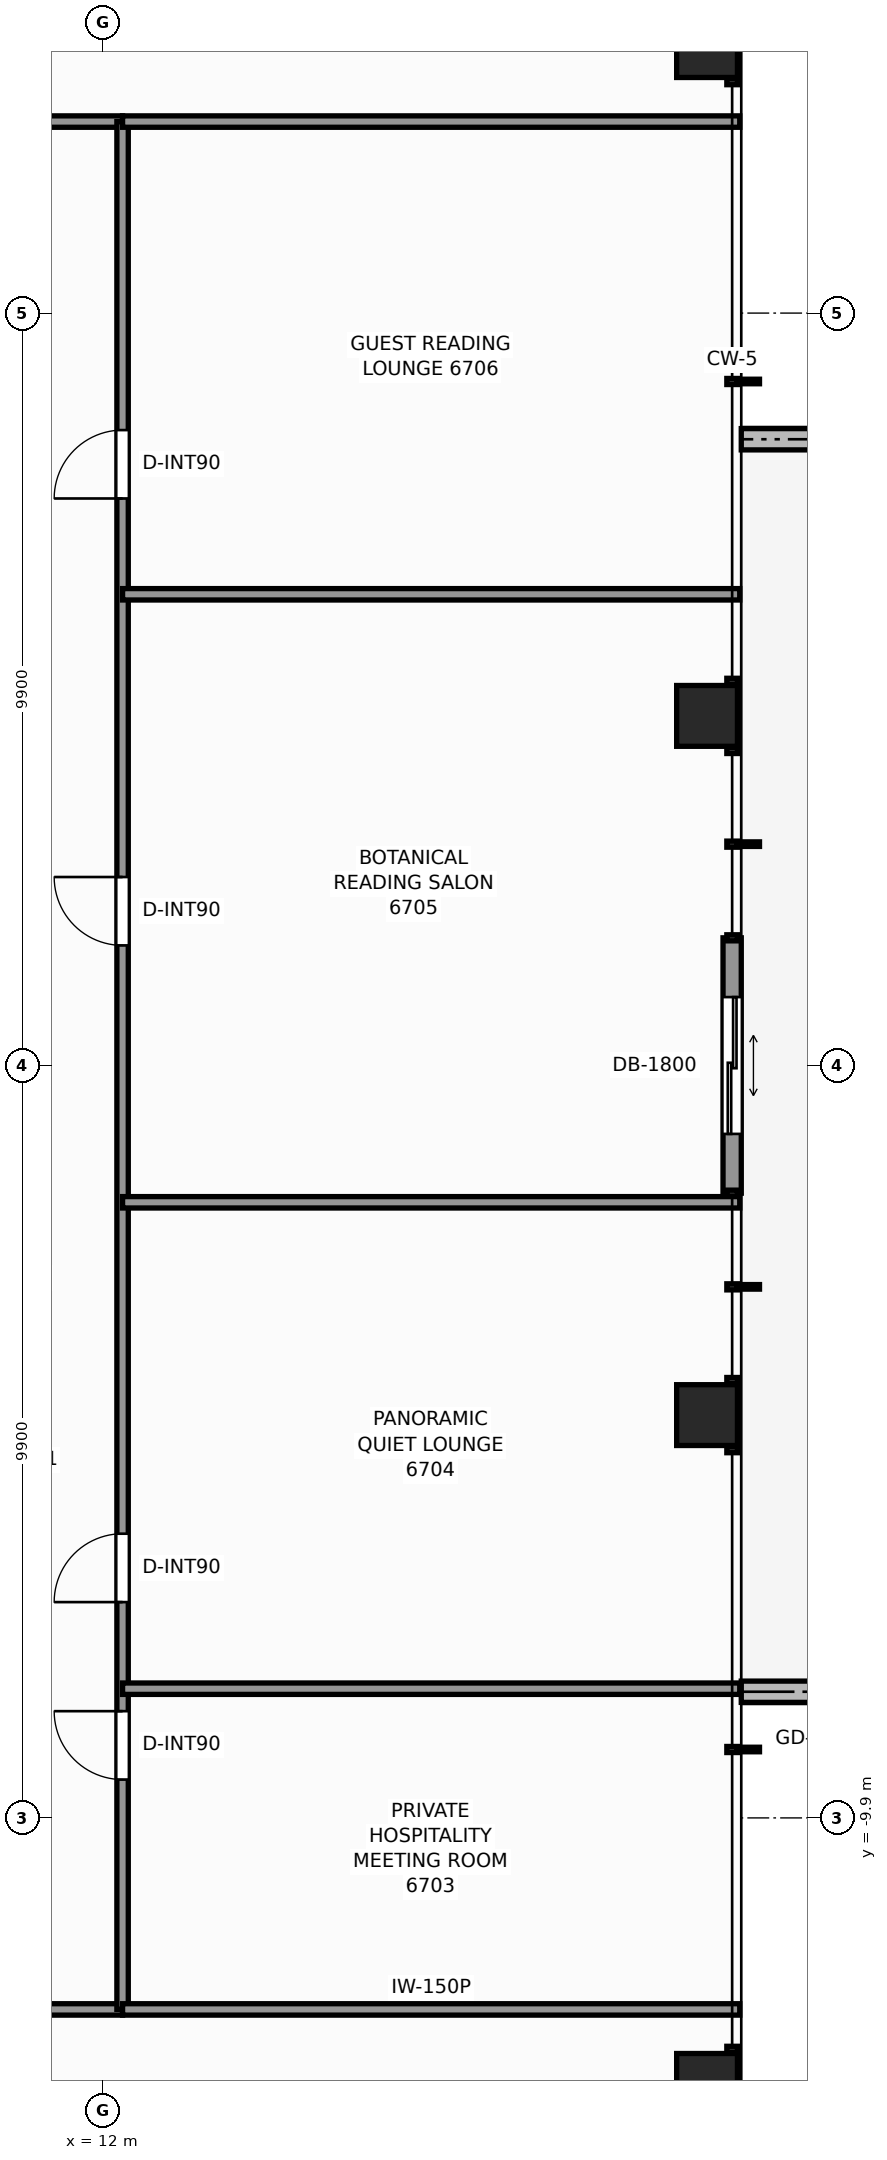
"""IFC4 building model, lengths in metres.
Left out: names, types, materials, properties, quantities, classifications, styles, units other than length and angle.
Written with IfcOpenShell. Run it as: python <this file> out.ifc"""

import sys

from ifc_helpers import new_model, si_unit, direction, frame, frame_2d, origin, origin_2d, place, context, subcontext, project, spatial, rectangle, extrude, element, fill, save


model = new_model("IFC4")
c1 = context("Model", 3, precision=1e-05, world=origin(), true_north=direction((0.0, 1.0)))
c2 = subcontext(c1, "Body", "Model", "MODEL_VIEW")
j1 = project(units=[si_unit("LENGTHUNIT", "METRE"), si_unit("PLANEANGLEUNIT", "RADIAN")], contexts=[c1])
p1 = place(None, origin())
s1 = spatial("IfcSite", under=j1, at=p1, CompositionType="ELEMENT")
p2 = place(p1, origin())
s2 = spatial("IfcBuilding", under=s1, at=p2, CompositionType="ELEMENT")
p3 = place(p2, frame((0.0, 0.0, 229.5)))
s3 = spatial("IfcBuildingStorey", under=s2, at=p3, CompositionType="ELEMENT", Elevation=229.5)
for number, where, z_axis, x_axis in (
    (1, (19.95, -13.4, 0.0), (0.0, 0.0, 1.0), (1.0, 0.0, 0.0)),
    (2, (19.95, -4.6, 0.0), (0.0, 0.0, 1.0), (1.0, 0.0, 0.0)),
    (3, (19.95, 4.6, 0.0), (0.0, 0.0, 1.0), (1.0, 0.0, 0.0)),
    (4, (19.95, 13.4, 0.0), (0.0, 0.0, 1.0), (1.0, 0.0, 0.0)),
):
    element("IfcColumn", number, at=place(p3, frame(where, z_axis=z_axis, x_axis=x_axis)), inside=s3, PredefinedType="COLUMN", context=c2, shape_type="SweptSolid", body=[
        extrude(rectangle(XDim=0.8, YDim=0.8, at=origin_2d()), origin(), (0.0, 0.0, 1.0), 3.3),
    ])
p4 = place(p3, frame((21.713, 8.24, -0.04), z_axis=(0.0, 0.0, 1.0), x_axis=(-1.0, 0.0, 0.0)))
e5 = element("IfcWall", 5, at=p4, inside=s3, PredefinedType="PARAPET", context=c2, shape_type="SweptSolid", body=[
    extrude(rectangle(XDim=1.313, YDim=0.28, at=frame_2d((0.656, 0.0))), origin(), (0.0, 0.0, 1.0), 0.42),
])
p5 = place(p3, frame((20.4, -8.24, -0.04), z_axis=(0.0, 0.0, 1.0), x_axis=(1.0, 0.0, 0.0)))
e6 = element("IfcWall", 6, at=p5, inside=s3, PredefinedType="PARAPET", context=c2, shape_type="SweptSolid", body=[
    extrude(rectangle(XDim=1.705, YDim=0.28, at=frame_2d((0.853, 0.0))), origin(), (0.0, 0.0, 1.0), 0.42),
])
p6 = place(p3, frame((20.28, 1.68, 0.0), z_axis=(0.0, 0.0, 1.0), x_axis=(0.0, -1.0, 0.0)))
e7 = element("IfcWall", 7, at=p6, inside=s3, PredefinedType="STANDARD", context=c2, shape_type="SweptSolid", body=[
    extrude(rectangle(XDim=3.36, YDim=0.24, at=frame_2d((1.68, 0.0))), origin(), (0.0, 0.0, 1.0), 2.95),
])
p7 = place(p6, frame((0.78, 0.0, 0.0)))
e8 = element("IfcOpeningElement", 8, at=p7, cuts=e7, PredefinedType="OPENING", context=c2, shape_type="SweptSolid", body=[
    extrude(rectangle(XDim=1.8, YDim=2.2, at=frame_2d((0.9, 1.1))), frame((0.0, 0.13, 0.0), z_axis=(0.0, -1.0, 0.0), x_axis=(1.0, 0.0, 0.0)), (0.0, 0.0, 1.0), 0.26),
])
p8 = place(p3, frame((-12.42, -12.42, 0.0), z_axis=(0.0, 0.0, 1.0), x_axis=(1.0, 0.0, 0.0)))
e9 = element("IfcWall", 9, at=p8, inside=s3, PredefinedType="PARTITIONING", context=c2, shape_type="SweptSolid", body=[
    extrude(rectangle(XDim=24.68, YDim=0.15, at=frame_2d((12.34, 0.0))), origin(), (0.0, 0.0, 1.0), 2.239),
])
p9 = place(p8, frame((4.435, 0.0, 0.0)))
e10 = element("IfcOpeningElement", 10, at=p9, cuts=e9, PredefinedType="OPENING", context=c2, shape_type="SweptSolid", body=[
    extrude(rectangle(XDim=0.9, YDim=2.06, at=frame_2d((0.45, 1.03))), frame((0.0, 0.085, 0.0), z_axis=(0.0, -1.0, 0.0), x_axis=(1.0, 0.0, 0.0)), (0.0, 0.0, 1.0), 0.17),
])
p10 = place(p8, frame((19.505, 0.0, 0.0)))
e11 = element("IfcOpeningElement", 11, at=p10, cuts=e9, PredefinedType="OPENING", context=c2, shape_type="SweptSolid", body=[
    extrude(rectangle(XDim=0.9, YDim=2.06, at=frame_2d((0.45, 1.03))), frame((0.0, 0.085, 0.0), z_axis=(0.0, -1.0, 0.0), x_axis=(1.0, 0.0, 0.0)), (0.0, 0.0, 1.0), 0.17),
])
p11 = place(p3, frame((-12.42, 12.42, 0.0), z_axis=(0.0, 0.0, 1.0), x_axis=(1.0, 0.0, 0.0)))
e12 = element("IfcWall", 12, at=p11, inside=s3, PredefinedType="PARTITIONING", context=c2, shape_type="SweptSolid", body=[
    extrude(rectangle(XDim=24.68, YDim=0.15, at=frame_2d((12.34, 0.0))), origin(), (0.0, 0.0, 1.0), 2.239),
])
p12 = place(p11, frame((3.524, 0.0, 0.0)))
e13 = element("IfcOpeningElement", 13, at=p12, cuts=e12, PredefinedType="OPENING", context=c2, shape_type="SweptSolid", body=[
    extrude(rectangle(XDim=0.9, YDim=2.06, at=frame_2d((0.45, 1.03))), frame((0.0, 0.085, 0.0), z_axis=(0.0, -1.0, 0.0), x_axis=(1.0, 0.0, 0.0)), (0.0, 0.0, 1.0), 0.17),
])
p13 = place(p11, frame((5.859, 0.0, 0.0)))
e14 = element("IfcOpeningElement", 14, at=p13, cuts=e12, PredefinedType="OPENING", context=c2, shape_type="SweptSolid", body=[
    extrude(rectangle(XDim=0.9, YDim=2.06, at=frame_2d((0.45, 1.03))), frame((0.0, 0.085, 0.0), z_axis=(0.0, -1.0, 0.0), x_axis=(1.0, 0.0, 0.0)), (0.0, 0.0, 1.0), 0.17),
])
p14 = place(p11, frame((9.538, 0.0, 0.0)))
e15 = element("IfcOpeningElement", 15, at=p14, cuts=e12, PredefinedType="OPENING", context=c2, shape_type="SweptSolid", body=[
    extrude(rectangle(XDim=0.9, YDim=2.06, at=frame_2d((0.45, 1.03))), frame((0.0, 0.085, 0.0), z_axis=(0.0, -1.0, 0.0), x_axis=(1.0, 0.0, 0.0)), (0.0, 0.0, 1.0), 0.17),
])
p15 = place(p11, frame((13.002, 0.0, 0.0)))
e16 = element("IfcOpeningElement", 16, at=p15, cuts=e12, PredefinedType="OPENING", context=c2, shape_type="SweptSolid", body=[
    extrude(rectangle(XDim=0.95, YDim=2.06, at=frame_2d((0.475, 1.03))), frame((0.0, 0.085, 0.0), z_axis=(0.0, -1.0, 0.0), x_axis=(1.0, 0.0, 0.0)), (0.0, 0.0, 1.0), 0.17),
])
p16 = place(p11, frame((18.515, 0.0, 0.0)))
e17 = element("IfcOpeningElement", 17, at=p16, cuts=e12, PredefinedType="OPENING", context=c2, shape_type="SweptSolid", body=[
    extrude(rectangle(XDim=0.9, YDim=2.06, at=frame_2d((0.45, 1.03))), frame((0.0, 0.085, 0.0), z_axis=(0.0, -1.0, 0.0), x_axis=(1.0, 0.0, 0.0)), (0.0, 0.0, 1.0), 0.17),
])
p17 = place(p11, frame((20.85, 0.0, 0.0)))
e18 = element("IfcOpeningElement", 18, at=p17, cuts=e12, PredefinedType="OPENING", context=c2, shape_type="SweptSolid", body=[
    extrude(rectangle(XDim=0.9, YDim=2.06, at=frame_2d((0.45, 1.03))), frame((0.0, 0.085, 0.0), z_axis=(0.0, -1.0, 0.0), x_axis=(1.0, 0.0, 0.0)), (0.0, 0.0, 1.0), 0.17),
])
p18 = place(p3, frame((12.26, -12.42, 0.0), z_axis=(0.0, 0.0, 1.0), x_axis=(0.0, 1.0, 0.0)))
e19 = element("IfcWall", 19, at=p18, inside=s3, PredefinedType="PARTITIONING", context=c2, shape_type="SweptSolid", body=[
    extrude(rectangle(XDim=24.84, YDim=0.15, at=frame_2d((12.42, 0.0))), origin(), (0.0, 0.0, 1.0), 2.239),
])
p19 = place(p18, frame((3.024, 0.0, 0.0)))
e20 = element("IfcOpeningElement", 20, at=p19, cuts=e19, PredefinedType="OPENING", context=c2, shape_type="SweptSolid", body=[
    extrude(rectangle(XDim=0.9, YDim=2.06, at=frame_2d((0.45, 1.03))), frame((0.0, 0.085, 0.0), z_axis=(0.0, -1.0, 0.0), x_axis=(1.0, 0.0, 0.0)), (0.0, 0.0, 1.0), 0.17),
])
p20 = place(p18, frame((5.359, 0.0, 0.0)))
e21 = element("IfcOpeningElement", 21, at=p20, cuts=e19, PredefinedType="OPENING", context=c2, shape_type="SweptSolid", body=[
    extrude(rectangle(XDim=0.9, YDim=2.06, at=frame_2d((0.45, 1.03))), frame((0.0, 0.085, 0.0), z_axis=(0.0, -1.0, 0.0), x_axis=(1.0, 0.0, 0.0)), (0.0, 0.0, 1.0), 0.17),
])
p21 = place(p18, frame((14.0, 0.0, 0.0)))
e22 = element("IfcOpeningElement", 22, at=p21, cuts=e19, PredefinedType="OPENING", context=c2, shape_type="SweptSolid", body=[
    extrude(rectangle(XDim=0.9, YDim=2.06, at=frame_2d((0.45, 1.03))), frame((0.0, 0.085, 0.0), z_axis=(0.0, -1.0, 0.0), x_axis=(1.0, 0.0, 0.0)), (0.0, 0.0, 1.0), 0.17),
])
p22 = place(p18, frame((19.881, 0.0, 0.0)))
e23 = element("IfcOpeningElement", 23, at=p22, cuts=e19, PredefinedType="OPENING", context=c2, shape_type="SweptSolid", body=[
    extrude(rectangle(XDim=0.9, YDim=2.06, at=frame_2d((0.45, 1.03))), frame((0.0, 0.085, 0.0), z_axis=(0.0, -1.0, 0.0), x_axis=(1.0, 0.0, 0.0)), (0.0, 0.0, 1.0), 0.17),
])
for number, where, z_axis, x_axis in (
    (24, (12.26, -12.42, 0.0), (0.0, 0.0, 1.0), (1.0, 0.0, 0.0)),
    (25, (12.26, 12.42, 0.0), (0.0, 0.0, 1.0), (1.0, 0.0, 0.0)),
):
    element("IfcWall", number, at=place(p3, frame(where, z_axis=z_axis, x_axis=x_axis)), inside=s3, PredefinedType="PARTITIONING", context=c2, shape_type="SweptSolid", body=[
        extrude(rectangle(XDim=8.12, YDim=0.15, at=frame_2d((4.06, 0.0))), origin(), (0.0, 0.0, 1.0), 2.239),
    ])
for number, where, z_axis, x_axis in (
    (26, (12.26, -8.2, 0.0), (0.0, 0.0, 1.0), (1.0, 0.0, 0.0)),
    (27, (12.26, -1.8, 0.0), (0.0, 0.0, 1.0), (1.0, 0.0, 0.0)),
    (28, (12.26, 6.2, 0.0), (0.0, 0.0, 1.0), (1.0, 0.0, 0.0)),
):
    element("IfcWall", number, at=place(p3, frame(where, z_axis=z_axis, x_axis=x_axis)), inside=s3, PredefinedType="PARTITIONING", context=c2, shape_type="SweptSolid", body=[
        extrude(rectangle(XDim=8.12, YDim=0.15, at=frame_2d((4.06, 0.0))), origin(), (0.0, 0.0, 1.0), 2.323),
    ])
p23 = place(p7, origin())
e29 = element("IfcDoor", 29, at=p23, inside=s3, OperationType="DOUBLE_DOOR_SLIDING", PredefinedType="DOOR", context=c2, shape_type="SweptSolid", body=[
    extrude(rectangle(XDim=1.8, YDim=2.2, at=frame_2d((0.9, 1.1))), frame((0.0, 0.025, 0.0), z_axis=(0.0, -1.0, 0.0), x_axis=(1.0, 0.0, 0.0)), (0.0, 0.0, 1.0), 0.05),
])
fill(e8, e29)
p24 = place(p19, origin())
e30 = element("IfcDoor", 30, at=p24, inside=s3, OperationType="SINGLE_SWING_RIGHT", PredefinedType="DOOR", context=c2, shape_type="SweptSolid", body=[
    extrude(rectangle(XDim=0.9, YDim=2.06, at=frame_2d((0.45, 1.03))), frame((0.0, 0.025, 0.0), z_axis=(0.0, -1.0, 0.0), x_axis=(1.0, 0.0, 0.0)), (0.0, 0.0, 1.0), 0.05),
])
fill(e20, e30)
p25 = place(p20, origin())
e31 = element("IfcDoor", 31, at=p25, inside=s3, OperationType="SINGLE_SWING_LEFT", PredefinedType="DOOR", context=c2, shape_type="SweptSolid", body=[
    extrude(rectangle(XDim=0.9, YDim=2.06, at=frame_2d((0.45, 1.03))), frame((0.0, 0.025, 0.0), z_axis=(0.0, -1.0, 0.0), x_axis=(1.0, 0.0, 0.0)), (0.0, 0.0, 1.0), 0.05),
])
fill(e21, e31)
p26 = place(p21, origin())
e32 = element("IfcDoor", 32, at=p26, inside=s3, OperationType="SINGLE_SWING_RIGHT", PredefinedType="DOOR", context=c2, shape_type="SweptSolid", body=[
    extrude(rectangle(XDim=0.9, YDim=2.06, at=frame_2d((0.45, 1.03))), frame((0.0, 0.025, 0.0), z_axis=(0.0, -1.0, 0.0), x_axis=(1.0, 0.0, 0.0)), (0.0, 0.0, 1.0), 0.05),
])
fill(e22, e32)
p27 = place(p22, origin())
e33 = element("IfcDoor", 33, at=p27, inside=s3, OperationType="SINGLE_SWING_LEFT", PredefinedType="DOOR", context=c2, shape_type="SweptSolid", body=[
    extrude(rectangle(XDim=0.9, YDim=2.06, at=frame_2d((0.45, 1.03))), frame((0.0, 0.025, 0.0), z_axis=(0.0, -1.0, 0.0), x_axis=(1.0, 0.0, 0.0)), (0.0, 0.0, 1.0), 0.05),
])
fill(e23, e33)
save(model, sys.argv[1])
